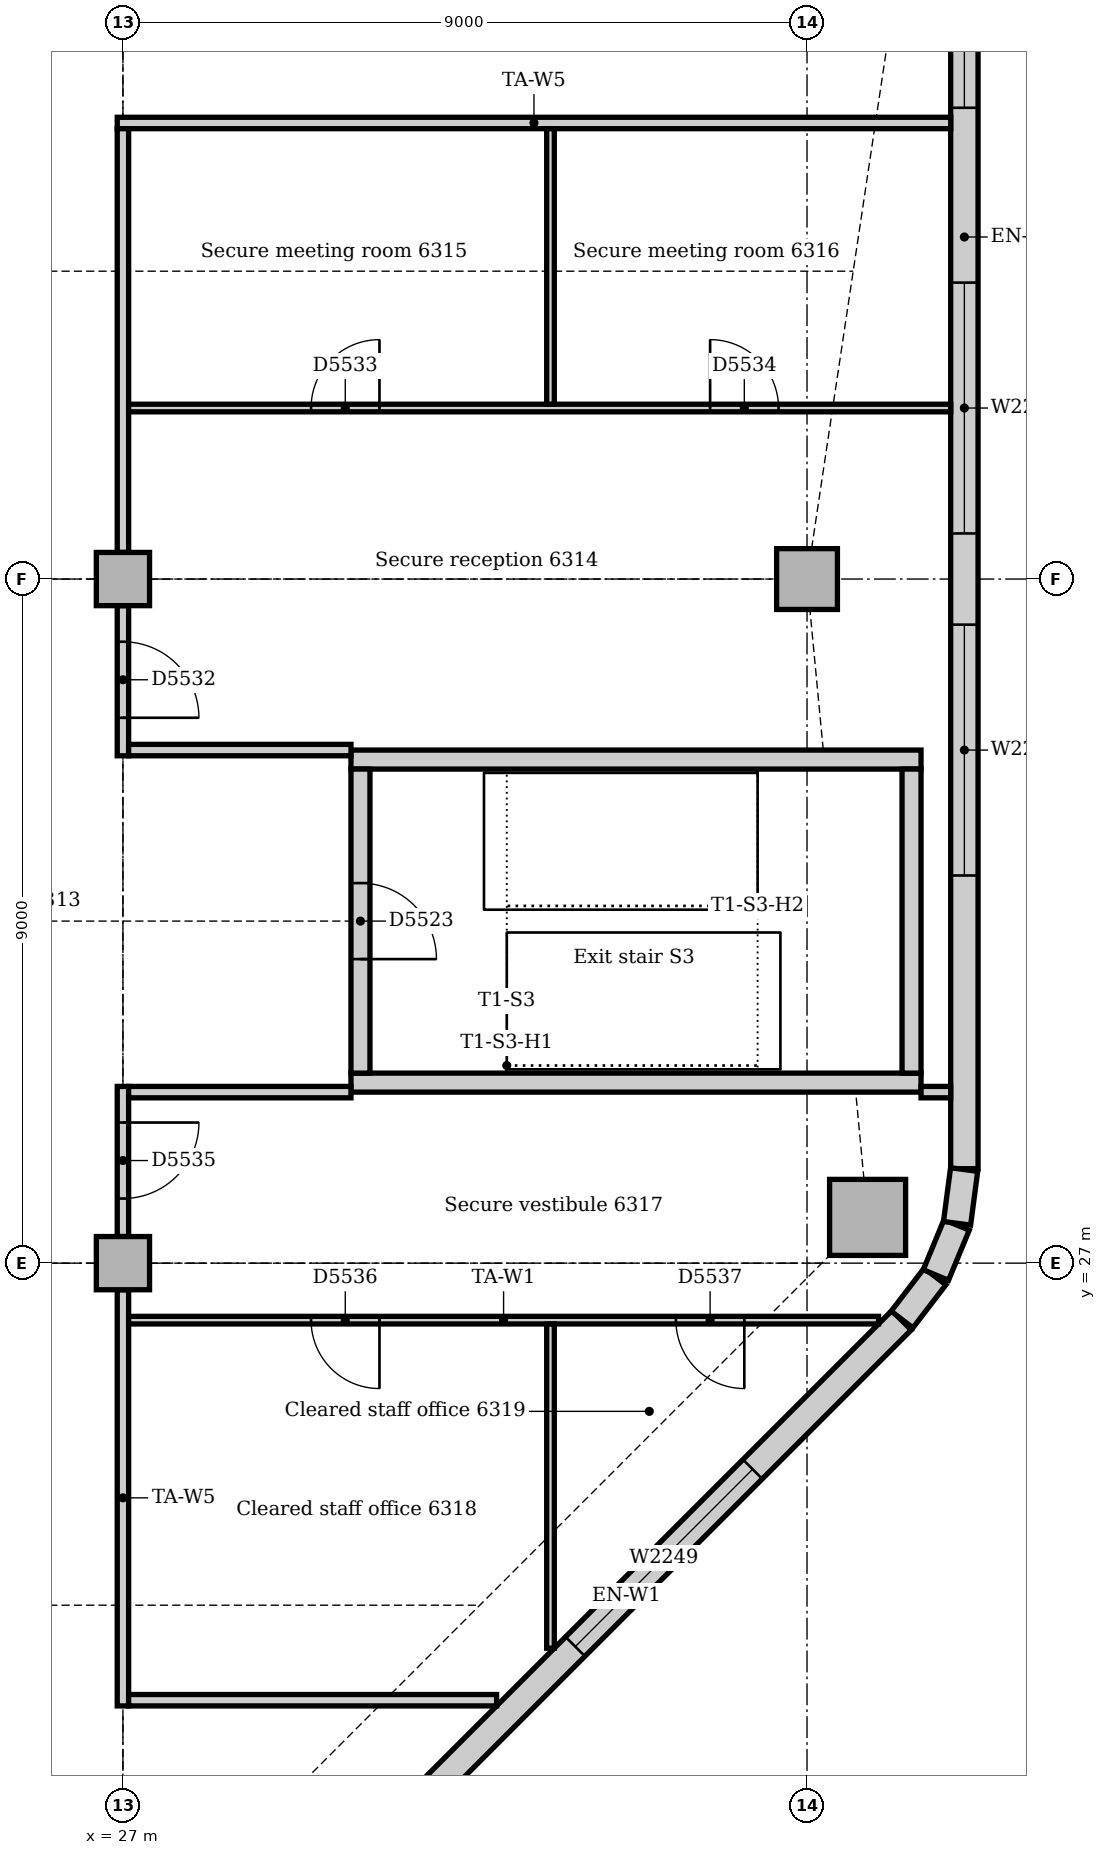
"""IFC4 building model, lengths in metres.
Left out: names, types, materials, properties, quantities, classifications, styles, units other than length and angle.
Written with IfcOpenShell. Run it as: python <this file> out.ifc"""

import sys

from ifc_helpers import new_model, si_unit, direction, frame, frame_2d, origin, origin_2d, place, context, subcontext, project, spatial, rectangle, extrude, element, fill, save


model = new_model("IFC4")
c1 = context("Model", 3, precision=1e-05, world=origin(), true_north=direction((0.0, 1.0)))
c2 = subcontext(c1, "Body", "Model", "MODEL_VIEW")
j1 = project(units=[si_unit("LENGTHUNIT", "METRE"), si_unit("PLANEANGLEUNIT", "RADIAN")], contexts=[c1])
p1 = place(None, origin())
s1 = spatial("IfcSite", under=j1, at=p1, CompositionType="ELEMENT")
p2 = place(p1, origin())
s2 = spatial("IfcBuilding", under=s1, at=p2, CompositionType="ELEMENT")
p3 = place(p2, frame((0.0, 0.0, 263.0)))
s3 = spatial("IfcBuildingStorey", under=s2, at=p3, CompositionType="ELEMENT", Elevation=263.0)
for number, where, z_axis, x_axis in (
    (1, (30.0, 29.375, 0.0), (0.0, 0.0, 1.0), (1.0, 0.0, 0.0)),
    (2, (37.5, 33.625, 0.0), (0.0, 0.0, 1.0), (-1.0, 0.0, 0.0)),
):
    element("IfcWall", number, at=place(p3, frame(where, z_axis=z_axis, x_axis=x_axis)), inside=s3, PredefinedType="SOLIDWALL", context=c2, shape_type="SweptSolid", body=[
        extrude(rectangle(XDim=7.5, YDim=0.25, at=frame_2d((3.75, 0.0))), origin(), (0.0, 0.0, 1.0), 4.0),
    ])
p4 = place(p3, frame((37.375, 29.5, 0.0), z_axis=(0.0, 0.0, 1.0), x_axis=(0.0, 1.0, 0.0)))
e3 = element("IfcWall", 3, at=p4, inside=s3, PredefinedType="SOLIDWALL", context=c2, shape_type="SweptSolid", body=[
    extrude(rectangle(XDim=4.0, YDim=0.25, at=frame_2d((2.0, 0.0))), origin(), (0.0, 0.0, 1.0), 4.0),
])
p5 = place(p3, frame((30.125, 33.5, 0.0), z_axis=(0.0, 0.0, 1.0), x_axis=(0.0, -1.0, 0.0)))
e4 = element("IfcWall", 4, at=p5, inside=s3, PredefinedType="SOLIDWALL", context=c2, shape_type="SweptSolid", body=[
    extrude(rectangle(XDim=4.0, YDim=0.25, at=frame_2d((2.0, 0.0))), origin(), (0.0, 0.0, 1.0), 4.0),
])
p6 = place(p5, frame((1.5, 0.0, 0.0)))
e5 = element("IfcOpeningElement", 5, at=p6, cuts=e4, PredefinedType="OPENING", context=c2, shape_type="SweptSolid", body=[
    extrude(rectangle(XDim=1.0, YDim=2.1, at=frame_2d((0.5, 1.05))), frame((0.0, 0.135, 0.0), z_axis=(0.0, -1.0, 0.0), x_axis=(1.0, 0.0, 0.0)), (0.0, 0.0, 1.0), 0.27),
])
p7 = place(p3, frame((36.797, 27.602, 0.0), z_axis=(0.0, 0.0, 1.0), x_axis=(1.0, 0.0, 0.0)))
e6 = element("IfcColumn", 6, at=p7, inside=s3, PredefinedType="COLUMN", context=c2, shape_type="SweptSolid", body=[
    extrude(rectangle(XDim=1.0, YDim=1.0, at=origin_2d()), origin(), (0.0, 0.0, 1.0), 3.85),
])
p8 = place(p3, frame((36.0, 36.0, 0.0), z_axis=(0.0, 0.0, 1.0), x_axis=(1.0, 0.0, 0.0)))
e7 = element("IfcColumn", 7, at=p8, inside=s3, PredefinedType="COLUMN", context=c2, shape_type="SweptSolid", body=[
    extrude(rectangle(XDim=0.8, YDim=0.8, at=origin_2d()), origin(), (0.0, 0.0, 1.0), 3.85),
])
for number, where, z_axis, x_axis in (
    (8, (27.0, 27.0, 0.0), (0.0, 0.0, 1.0), (1.0, 0.0, 0.0)),
    (9, (27.0, 36.0, 0.0), (0.0, 0.0, 1.0), (1.0, 0.0, 0.0)),
):
    element("IfcColumn", number, at=place(p3, frame(where, z_axis=z_axis, x_axis=x_axis)), inside=s3, PredefinedType="COLUMN", context=c2, shape_type="SweptSolid", body=[
        extrude(rectangle(XDim=0.7, YDim=0.7, at=origin_2d()), origin(), (0.0, 0.0, 1.0), 3.85),
    ])
p9 = place(p3, frame((30.001, 19.006, 0.0), z_axis=(0.0, 0.0, 1.0), x_axis=(0.707106781187, 0.707106781187, 0.0)))
e10 = element("IfcWall", 10, at=p9, inside=s3, PredefinedType="STANDARD", context=c2, shape_type="SweptSolid", body=[
    extrude(rectangle(XDim=10.243, YDim=0.36, at=frame_2d((5.121, 0.0))), origin(), (0.0, 0.0, 1.0), 3.85),
])
p10 = place(p9, frame((4.171, 0.0, 0.9)))
e11 = element("IfcOpeningElement", 11, at=p10, cuts=e10, PredefinedType="OPENING", context=c2, shape_type="SweptSolid", body=[
    extrude(rectangle(XDim=3.3, YDim=1.6, at=frame_2d((1.65, 0.8))), frame((0.0, 0.19, 0.0), z_axis=(0.0, -1.0, 0.0), x_axis=(1.0, 0.0, 0.0)), (0.0, 0.0, 1.0), 0.38),
])
p11 = place(p3, frame((38.07, 28.243, 0.0), z_axis=(0.0, 0.0, 1.0), x_axis=(0.0, 1.0, 0.0)))
e12 = element("IfcWall", 12, at=p11, inside=s3, PredefinedType="STANDARD", context=c2, shape_type="SweptSolid", body=[
    extrude(rectangle(XDim=24.515, YDim=0.36, at=frame_2d((12.257, 0.0))), origin(), (0.0, 0.0, 1.0), 3.85),
])
p12 = place(p11, frame((3.857, 0.0, 0.9)))
e13 = element("IfcOpeningElement", 13, at=p12, cuts=e12, PredefinedType="OPENING", context=c2, shape_type="SweptSolid", body=[
    extrude(rectangle(XDim=3.3, YDim=1.6, at=frame_2d((1.65, 0.8))), frame((0.0, 0.19, 0.0), z_axis=(0.0, -1.0, 0.0), x_axis=(1.0, 0.0, 0.0)), (0.0, 0.0, 1.0), 0.38),
])
p13 = place(p11, frame((8.357, 0.0, 0.9)))
e14 = element("IfcOpeningElement", 14, at=p13, cuts=e12, PredefinedType="OPENING", context=c2, shape_type="SweptSolid", body=[
    extrude(rectangle(XDim=3.3, YDim=1.6, at=frame_2d((1.65, 0.8))), frame((0.0, 0.19, 0.0), z_axis=(0.0, -1.0, 0.0), x_axis=(1.0, 0.0, 0.0)), (0.0, 0.0, 1.0), 0.38),
])
p14 = place(p11, frame((13.957, 0.0, 0.9)))
e15 = element("IfcOpeningElement", 15, at=p14, cuts=e12, PredefinedType="OPENING", context=c2, shape_type="SweptSolid", body=[
    extrude(rectangle(XDim=1.8, YDim=1.6, at=frame_2d((0.9, 0.8))), frame((0.0, 0.19, 0.0), z_axis=(0.0, -1.0, 0.0), x_axis=(1.0, 0.0, 0.0)), (0.0, 0.0, 1.0), 0.38),
])
p15 = place(p11, frame((17.357, 0.0, 0.9)))
e16 = element("IfcOpeningElement", 16, at=p15, cuts=e12, PredefinedType="OPENING", context=c2, shape_type="SweptSolid", body=[
    extrude(rectangle(XDim=3.3, YDim=1.6, at=frame_2d((1.65, 0.8))), frame((0.0, 0.19, 0.0), z_axis=(0.0, -1.0, 0.0), x_axis=(1.0, 0.0, 0.0)), (0.0, 0.0, 1.0), 0.38),
])
p16 = place(p3, frame((37.25, 26.259, 0.0), z_axis=(0.0, 0.0, 1.0), x_axis=(0.608802368033, 0.793321924995, 0.0)))
e17 = element("IfcWall", 17, at=p16, inside=s3, PredefinedType="STANDARD", context=c2, shape_type="SweptSolid", body=[
    extrude(rectangle(XDim=0.713, YDim=0.36, at=frame_2d((0.357, 0.0))), origin(), (0.0, 0.0, 1.0), 3.85),
])
for number, where, z_axis, x_axis in (
    (18, (37.695, 26.844, 0.0), (0.0, 0.0, 1.0), (0.383, 0.924, 0.0)),
    (19, (37.974, 27.524, 0.0), (0.0, 0.0, 1.0), (0.131, 0.991, 0.0)),
):
    element("IfcWall", number, at=place(p3, frame(where, z_axis=z_axis, x_axis=x_axis)), inside=s3, PredefinedType="STANDARD", context=c2, shape_type="SweptSolid", body=[
        extrude(rectangle(XDim=0.713, YDim=0.36, at=frame_2d((0.356, 0.0))), origin(), (0.0, 0.0, 1.0), 3.85),
    ])
p17 = place(p3, frame((26.925, 42.0, 0.0), z_axis=(0.0, 0.0, 1.0), x_axis=(1.0, 0.0, 0.0)))
e20 = element("IfcWall", 20, at=p17, inside=s3, PredefinedType="PARTITIONING", context=c2, shape_type="SweptSolid", body=[
    extrude(rectangle(XDim=10.965, YDim=0.15, at=frame_2d((5.482, 0.0))), origin(), (0.0, 0.0, 1.0), 3.85),
])
p18 = place(p3, frame((27.0, 33.675, 0.0), z_axis=(0.0, 0.0, 1.0), x_axis=(0.0, 1.0, 0.0)))
e21 = element("IfcWall", 21, at=p18, inside=s3, PredefinedType="PARTITIONING", context=c2, shape_type="SweptSolid", body=[
    extrude(rectangle(XDim=1.975, YDim=0.15, at=frame_2d((0.988, 0.0))), origin(), (0.0, 0.0, 1.0), 3.4),
])
p19 = place(p18, frame((0.5, 0.0, 0.0)))
e22 = element("IfcOpeningElement", 22, at=p19, cuts=e21, PredefinedType="OPENING", context=c2, shape_type="SweptSolid", body=[
    extrude(rectangle(XDim=1.0, YDim=2.1, at=frame_2d((0.5, 1.05))), frame((0.0, 0.085, 0.0), z_axis=(0.0, -1.0, 0.0), x_axis=(1.0, 0.0, 0.0)), (0.0, 0.0, 1.0), 0.17),
])
p20 = place(p3, frame((27.0, 36.35, 0.0), z_axis=(0.0, 0.0, 1.0), x_axis=(0.0, 1.0, 0.0)))
e23 = element("IfcWall", 23, at=p20, inside=s3, PredefinedType="PARTITIONING", context=c2, shape_type="SweptSolid", body=[
    extrude(rectangle(XDim=5.575, YDim=0.15, at=frame_2d((2.788, 0.0))), origin(), (0.0, 0.0, 1.0), 3.4),
])
p21 = place(p3, frame((27.0, 21.175, 0.0), z_axis=(0.0, 0.0, 1.0), x_axis=(0.0, 1.0, 0.0)))
e24 = element("IfcWall", 24, at=p21, inside=s3, PredefinedType="PARTITIONING", context=c2, shape_type="SweptSolid", body=[
    extrude(rectangle(XDim=5.475, YDim=0.15, at=frame_2d((2.737, 0.0))), origin(), (0.0, 0.0, 1.0), 3.4),
])
p22 = place(p3, frame((27.0, 27.35, 0.0), z_axis=(0.0, 0.0, 1.0), x_axis=(0.0, 1.0, 0.0)))
e25 = element("IfcWall", 25, at=p22, inside=s3, PredefinedType="PARTITIONING", context=c2, shape_type="SweptSolid", body=[
    extrude(rectangle(XDim=1.975, YDim=0.15, at=frame_2d((0.988, 0.0))), origin(), (0.0, 0.0, 1.0), 3.4),
])
p23 = place(p22, frame((0.5, 0.0, 0.0)))
e26 = element("IfcOpeningElement", 26, at=p23, cuts=e25, PredefinedType="OPENING", context=c2, shape_type="SweptSolid", body=[
    extrude(rectangle(XDim=1.0, YDim=2.1, at=frame_2d((0.5, 1.05))), frame((0.0, 0.085, 0.0), z_axis=(0.0, -1.0, 0.0), x_axis=(1.0, 0.0, 0.0)), (0.0, 0.0, 1.0), 0.17),
])
p24 = place(p3, frame((27.075, 21.25, 0.0), z_axis=(0.0, 0.0, 1.0), x_axis=(1.0, 0.0, 0.0)))
e27 = element("IfcWall", 27, at=p24, inside=s3, PredefinedType="PARTITIONING", context=c2, shape_type="SweptSolid", body=[
    extrude(rectangle(XDim=4.841, YDim=0.15, at=frame_2d((2.421, 0.0))), origin(), (0.0, 0.0, 1.0), 3.85),
])
for number, where, z_axis, x_axis in (
    (28, (27.075, 29.25, 0.0), (0.0, 0.0, 1.0), (1.0, 0.0, 0.0)),
    (29, (27.075, 33.75, 0.0), (0.0, 0.0, 1.0), (1.0, 0.0, 0.0)),
):
    element("IfcWall", number, at=place(p3, frame(where, z_axis=z_axis, x_axis=x_axis)), inside=s3, PredefinedType="PARTITIONING", context=c2, shape_type="SweptSolid", body=[
        extrude(rectangle(XDim=2.925, YDim=0.15, at=frame_2d((1.462, 0.0))), origin(), (0.0, 0.0, 1.0), 3.85),
    ])
p25 = place(p3, frame((37.5, 29.25, 0.0), z_axis=(0.0, 0.0, 1.0), x_axis=(1.0, 0.0, 0.0)))
e30 = element("IfcWall", 30, at=p25, inside=s3, PredefinedType="PARTITIONING", context=c2, shape_type="SweptSolid", body=[
    extrude(rectangle(XDim=0.39, YDim=0.15, at=frame_2d((0.195, 0.0))), origin(), (0.0, 0.0, 1.0), 3.85),
])
p26 = place(p3, frame((27.075, 38.25, 0.0), z_axis=(0.0, 0.0, 1.0), x_axis=(1.0, 0.0, 0.0)))
e31 = element("IfcWall", 31, at=p26, inside=s3, PredefinedType="PARTITIONING", context=c2, shape_type="SweptSolid", body=[
    extrude(rectangle(XDim=10.815, YDim=0.1, at=frame_2d((5.407, 0.0))), origin(), (0.0, 0.0, 1.0), 3.85),
])
p27 = place(p26, frame((2.4, 0.0, 0.0)))
e32 = element("IfcOpeningElement", 32, at=p27, cuts=e31, PredefinedType="OPENING", context=c2, shape_type="SweptSolid", body=[
    extrude(rectangle(XDim=0.9, YDim=2.1, at=frame_2d((0.45, 1.05))), frame((0.0, 0.06, 0.0), z_axis=(0.0, -1.0, 0.0), x_axis=(1.0, 0.0, 0.0)), (0.0, 0.0, 1.0), 0.12),
])
p28 = place(p26, frame((7.65, 0.0, 0.0)))
e33 = element("IfcOpeningElement", 33, at=p28, cuts=e31, PredefinedType="OPENING", context=c2, shape_type="SweptSolid", body=[
    extrude(rectangle(XDim=0.9, YDim=2.1, at=frame_2d((0.45, 1.05))), frame((0.0, 0.06, 0.0), z_axis=(0.0, -1.0, 0.0), x_axis=(1.0, 0.0, 0.0)), (0.0, 0.0, 1.0), 0.12),
])
p29 = place(p3, frame((27.075, 26.25, 0.0), z_axis=(0.0, 0.0, 1.0), x_axis=(1.0, 0.0, 0.0)))
e34 = element("IfcWall", 34, at=p29, inside=s3, PredefinedType="PARTITIONING", context=c2, shape_type="SweptSolid", body=[
    extrude(rectangle(XDim=9.866, YDim=0.1, at=frame_2d((4.933, 0.0))), origin(), (0.0, 0.0, 1.0), 3.85),
])
p30 = place(p29, frame((2.4, 0.0, 0.0)))
e35 = element("IfcOpeningElement", 35, at=p30, cuts=e34, PredefinedType="OPENING", context=c2, shape_type="SweptSolid", body=[
    extrude(rectangle(XDim=0.9, YDim=2.1, at=frame_2d((0.45, 1.05))), frame((0.0, 0.06, 0.0), z_axis=(0.0, -1.0, 0.0), x_axis=(1.0, 0.0, 0.0)), (0.0, 0.0, 1.0), 0.12),
])
p31 = place(p29, frame((7.2, 0.0, 0.0)))
e36 = element("IfcOpeningElement", 36, at=p31, cuts=e34, PredefinedType="OPENING", context=c2, shape_type="SweptSolid", body=[
    extrude(rectangle(XDim=0.9, YDim=2.1, at=frame_2d((0.45, 1.05))), frame((0.0, 0.06, 0.0), z_axis=(0.0, -1.0, 0.0), x_axis=(1.0, 0.0, 0.0)), (0.0, 0.0, 1.0), 0.12),
])
p32 = place(p3, frame((32.625, 21.934, 0.0), z_axis=(0.0, 0.0, 1.0), x_axis=(0.0, 1.0, 0.0)))
e37 = element("IfcWall", 37, at=p32, inside=s3, PredefinedType="PARTITIONING", context=c2, shape_type="SweptSolid", body=[
    extrude(rectangle(XDim=4.266, YDim=0.1, at=frame_2d((2.133, 0.0))), origin(), (0.0, 0.0, 1.0), 3.85),
])
p33 = place(p3, frame((32.625, 38.3, 0.0), z_axis=(0.0, 0.0, 1.0), x_axis=(0.0, 1.0, 0.0)))
e38 = element("IfcWall", 38, at=p33, inside=s3, PredefinedType="PARTITIONING", context=c2, shape_type="SweptSolid", body=[
    extrude(rectangle(XDim=3.625, YDim=0.1, at=frame_2d((1.812, 0.0))), origin(), (0.0, 0.0, 1.0), 3.85),
])
p34 = place(p10, origin())
e39 = element("IfcWindow", 39, at=p34, inside=s3, PartitioningType="SINGLE_PANEL", PredefinedType="WINDOW", context=c2, shape_type="SweptSolid", body=[
    extrude(rectangle(XDim=3.3, YDim=1.6, at=frame_2d((1.65, 0.8))), frame((0.0, 0.13, 0.0), z_axis=(0.0, -1.0, 0.0), x_axis=(1.0, 0.0, 0.0)), (0.0, 0.0, 1.0), 0.06),
])
fill(e11, e39)
p35 = place(p12, origin())
e40 = element("IfcWindow", 40, at=p35, inside=s3, PartitioningType="SINGLE_PANEL", PredefinedType="WINDOW", context=c2, shape_type="SweptSolid", body=[
    extrude(rectangle(XDim=3.3, YDim=1.6, at=frame_2d((1.65, 0.8))), frame((0.0, 0.13, 0.0), z_axis=(0.0, -1.0, 0.0), x_axis=(1.0, 0.0, 0.0)), (0.0, 0.0, 1.0), 0.06),
])
fill(e13, e40)
p36 = place(p13, origin())
e41 = element("IfcWindow", 41, at=p36, inside=s3, PartitioningType="SINGLE_PANEL", PredefinedType="WINDOW", context=c2, shape_type="SweptSolid", body=[
    extrude(rectangle(XDim=3.3, YDim=1.6, at=frame_2d((1.65, 0.8))), frame((0.0, 0.13, 0.0), z_axis=(0.0, -1.0, 0.0), x_axis=(1.0, 0.0, 0.0)), (0.0, 0.0, 1.0), 0.06),
])
fill(e14, e41)
p37 = place(p14, origin())
e42 = element("IfcWindow", 42, at=p37, inside=s3, PartitioningType="SINGLE_PANEL", PredefinedType="WINDOW", context=c2, shape_type="SweptSolid", body=[
    extrude(rectangle(XDim=1.8, YDim=1.6, at=frame_2d((0.9, 0.8))), frame((0.0, 0.13, 0.0), z_axis=(0.0, -1.0, 0.0), x_axis=(1.0, 0.0, 0.0)), (0.0, 0.0, 1.0), 0.06),
])
fill(e15, e42)
p38 = place(p6, origin())
e43 = element("IfcDoor", 43, at=p38, inside=s3, OperationType="SINGLE_SWING_RIGHT", PredefinedType="DOOR", context=c2, shape_type="SweptSolid", body=[
    extrude(rectangle(XDim=1.0, YDim=2.1, at=frame_2d((0.5, 1.05))), frame((0.0, 0.025, 0.0), z_axis=(0.0, -1.0, 0.0), x_axis=(1.0, 0.0, 0.0)), (0.0, 0.0, 1.0), 0.05),
])
fill(e5, e43)
p39 = place(p19, frame((1.0, 0.0, 0.0), z_axis=(0.0, 0.0, 1.0), x_axis=(-1.0, 0.0, 0.0)))
e44 = element("IfcDoor", 44, at=p39, inside=s3, OperationType="SINGLE_SWING_RIGHT", PredefinedType="DOOR", context=c2, shape_type="SweptSolid", body=[
    extrude(rectangle(XDim=1.0, YDim=2.1, at=frame_2d((0.5, 1.05))), frame((0.0, 0.025, 0.0), z_axis=(0.0, -1.0, 0.0), x_axis=(1.0, 0.0, 0.0)), (0.0, 0.0, 1.0), 0.05),
])
fill(e22, e44)
p40 = place(p27, origin())
e45 = element("IfcDoor", 45, at=p40, inside=s3, OperationType="SINGLE_SWING_RIGHT", PredefinedType="DOOR", context=c2, shape_type="SweptSolid", body=[
    extrude(rectangle(XDim=0.9, YDim=2.1, at=frame_2d((0.45, 1.05))), frame((0.0, 0.025, 0.0), z_axis=(0.0, -1.0, 0.0), x_axis=(1.0, 0.0, 0.0)), (0.0, 0.0, 1.0), 0.05),
])
fill(e32, e45)
p41 = place(p28, origin())
e46 = element("IfcDoor", 46, at=p41, inside=s3, OperationType="SINGLE_SWING_LEFT", PredefinedType="DOOR", context=c2, shape_type="SweptSolid", body=[
    extrude(rectangle(XDim=0.9, YDim=2.1, at=frame_2d((0.45, 1.05))), frame((0.0, 0.025, 0.0), z_axis=(0.0, -1.0, 0.0), x_axis=(1.0, 0.0, 0.0)), (0.0, 0.0, 1.0), 0.05),
])
fill(e33, e46)
p42 = place(p23, frame((1.0, 0.0, 0.0), z_axis=(0.0, 0.0, 1.0), x_axis=(-1.0, 0.0, 0.0)))
e47 = element("IfcDoor", 47, at=p42, inside=s3, OperationType="SINGLE_SWING_LEFT", PredefinedType="DOOR", context=c2, shape_type="SweptSolid", body=[
    extrude(rectangle(XDim=1.0, YDim=2.1, at=frame_2d((0.5, 1.05))), frame((0.0, 0.025, 0.0), z_axis=(0.0, -1.0, 0.0), x_axis=(1.0, 0.0, 0.0)), (0.0, 0.0, 1.0), 0.05),
])
fill(e26, e47)
p43 = place(p30, frame((0.9, 0.0, 0.0), z_axis=(0.0, 0.0, 1.0), x_axis=(-1.0, 0.0, 0.0)))
e48 = element("IfcDoor", 48, at=p43, inside=s3, OperationType="SINGLE_SWING_LEFT", PredefinedType="DOOR", context=c2, shape_type="SweptSolid", body=[
    extrude(rectangle(XDim=0.9, YDim=2.1, at=frame_2d((0.45, 1.05))), frame((0.0, 0.025, 0.0), z_axis=(0.0, -1.0, 0.0), x_axis=(1.0, 0.0, 0.0)), (0.0, 0.0, 1.0), 0.05),
])
fill(e35, e48)
p44 = place(p31, frame((0.9, 0.0, 0.0), z_axis=(0.0, 0.0, 1.0), x_axis=(-1.0, 0.0, 0.0)))
e49 = element("IfcDoor", 49, at=p44, inside=s3, OperationType="SINGLE_SWING_LEFT", PredefinedType="DOOR", context=c2, shape_type="SweptSolid", body=[
    extrude(rectangle(XDim=0.9, YDim=2.1, at=frame_2d((0.45, 1.05))), frame((0.0, 0.025, 0.0), z_axis=(0.0, -1.0, 0.0), x_axis=(1.0, 0.0, 0.0)), (0.0, 0.0, 1.0), 0.05),
])
fill(e36, e49)
save(model, sys.argv[1])
